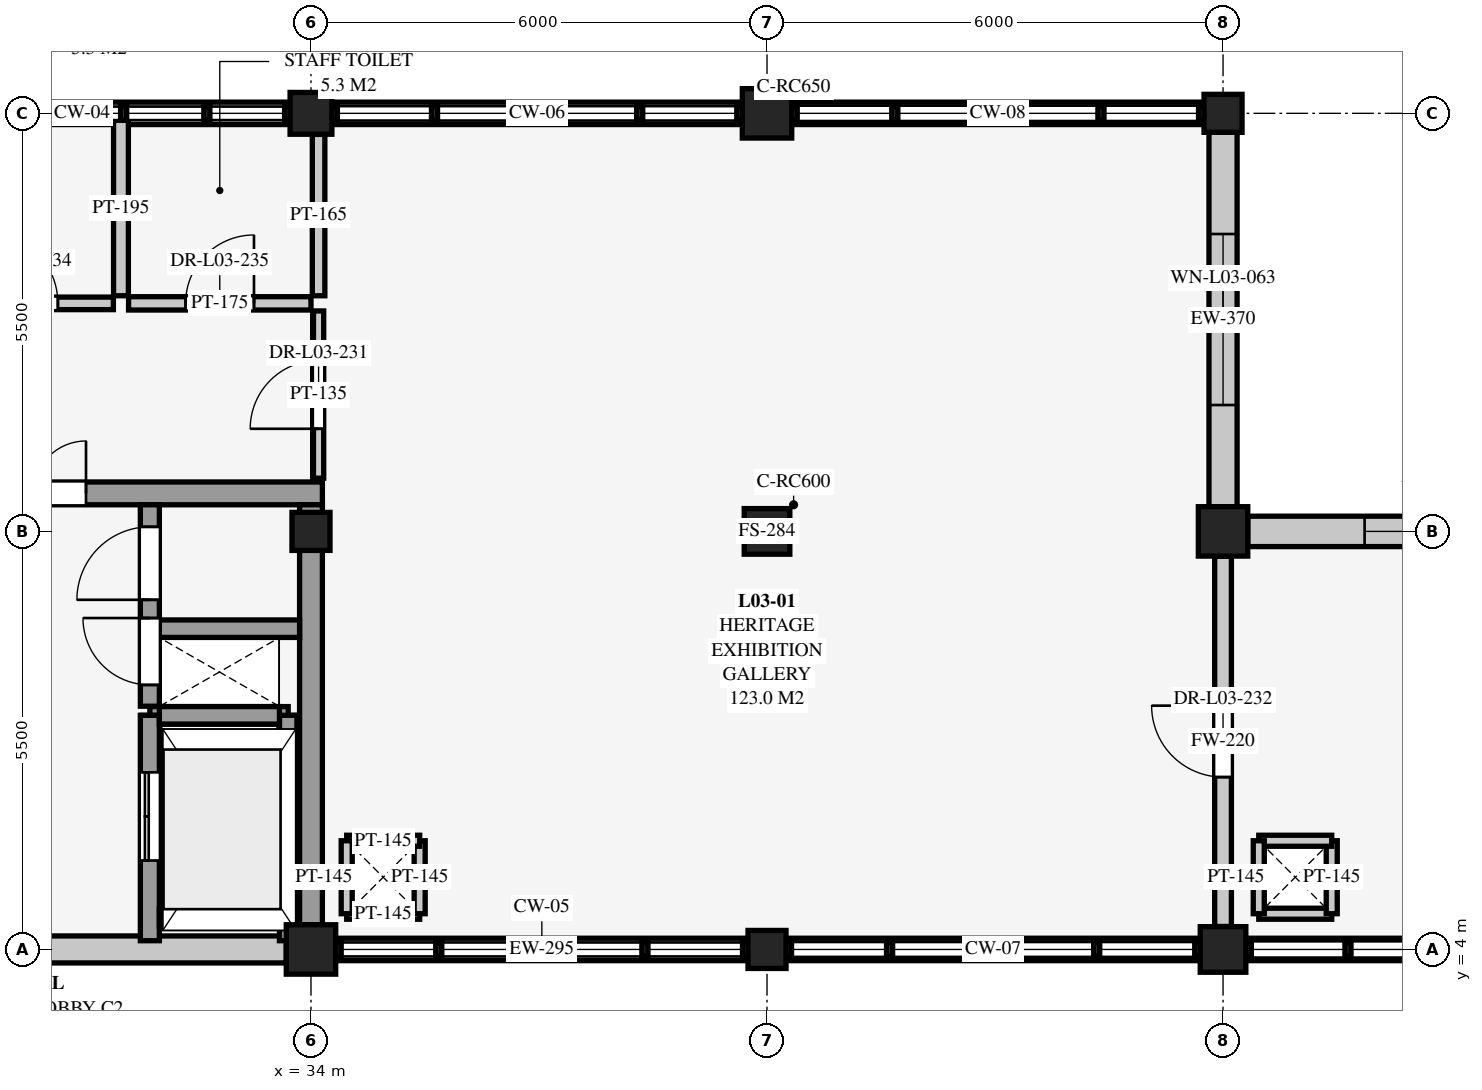
"""IFC4 building model, lengths in metres.
Left out: names, types, materials, properties, quantities, classifications, styles, units other than length and angle.
Written with IfcOpenShell. Run it as: python <this file> out.ifc"""

import sys

from ifc_helpers import new_model, si_unit, direction, frame, frame_2d, origin, origin_2d, place, context, subcontext, project, spatial, rectangle, extrude, element, fill, save


model = new_model("IFC4")
c1 = context("Model", 3, precision=1e-05, world=origin(), true_north=direction((0.0, 1.0)))
c2 = subcontext(c1, "Body", "Model", "MODEL_VIEW")
j1 = project(units=[si_unit("LENGTHUNIT", "METRE"), si_unit("PLANEANGLEUNIT", "RADIAN")], contexts=[c1])
p1 = place(None, origin())
s1 = spatial("IfcSite", under=j1, at=p1, CompositionType="ELEMENT")
p2 = place(p1, origin())
s2 = spatial("IfcBuilding", under=s1, at=p2, CompositionType="ELEMENT")
p3 = place(p2, frame((0.0, 0.0, 9.0)))
s3 = spatial("IfcBuildingStorey", under=s2, at=p3, CompositionType="ELEMENT", Elevation=9.0)
p4 = place(p3, frame((34.0, 4.0, 0.0), z_axis=(0.0, 0.0, 1.0), x_axis=(1.0, 0.0, 0.0)))
e1 = element("IfcColumn", 1, at=p4, inside=s3, PredefinedType="COLUMN", context=c2, shape_type="SweptSolid", body=[
    extrude(rectangle(XDim=0.65, YDim=0.65, at=origin_2d()), origin(), (0.0, 0.0, 1.0), 4.5),
])
p5 = place(p3, frame((34.0, 9.5, 0.0), z_axis=(0.0, 0.0, 1.0), x_axis=(1.0, 0.0, 0.0)))
e2 = element("IfcColumn", 2, at=p5, inside=s3, PredefinedType="COLUMN", context=c2, shape_type="SweptSolid", body=[
    extrude(rectangle(XDim=0.5, YDim=0.5, at=origin_2d()), origin(), (0.0, 0.0, 1.0), 4.5),
])
p6 = place(p3, frame((34.0, 15.0, 0.0), z_axis=(0.0, 0.0, 1.0), x_axis=(1.0, 0.0, 0.0)))
e3 = element("IfcColumn", 3, at=p6, inside=s3, PredefinedType="COLUMN", context=c2, shape_type="SweptSolid", body=[
    extrude(rectangle(XDim=0.55, YDim=0.55, at=origin_2d()), origin(), (0.0, 0.0, 1.0), 4.5),
])
p7 = place(p3, frame((40.0, 4.0, 0.0), z_axis=(0.0, 0.0, 1.0), x_axis=(1.0, 0.0, 0.0)))
e4 = element("IfcColumn", 4, at=p7, inside=s3, PredefinedType="COLUMN", context=c2, shape_type="SweptSolid", body=[
    extrude(rectangle(XDim=0.5, YDim=0.5, at=origin_2d()), origin(), (0.0, 0.0, 1.0), 4.5),
])
p8 = place(p3, frame((40.0, 9.5, 0.0), z_axis=(0.0, 0.0, 1.0), x_axis=(1.0, 0.0, 0.0)))
e5 = element("IfcColumn", 5, at=p8, inside=s3, PredefinedType="COLUMN", context=c2, shape_type="SweptSolid", body=[
    extrude(rectangle(XDim=0.6, YDim=0.6, at=origin_2d()), origin(), (0.0, 0.0, 1.0), 4.5),
])
p9 = place(p3, frame((40.0, 15.0, 0.0), z_axis=(0.0, 0.0, 1.0), x_axis=(1.0, 0.0, 0.0)))
e6 = element("IfcColumn", 6, at=p9, inside=s3, PredefinedType="COLUMN", context=c2, shape_type="SweptSolid", body=[
    extrude(rectangle(XDim=0.65, YDim=0.65, at=origin_2d()), origin(), (0.0, 0.0, 1.0), 4.5),
])
p10 = place(p3, frame((46.0, 4.0, 0.0), z_axis=(0.0, 0.0, 1.0), x_axis=(1.0, 0.0, 0.0)))
e7 = element("IfcColumn", 7, at=p10, inside=s3, PredefinedType="COLUMN", context=c2, shape_type="SweptSolid", body=[
    extrude(rectangle(XDim=0.6, YDim=0.6, at=origin_2d()), origin(), (0.0, 0.0, 1.0), 4.5),
])
p11 = place(p3, frame((46.0, 9.5, 0.0), z_axis=(0.0, 0.0, 1.0), x_axis=(1.0, 0.0, 0.0)))
e8 = element("IfcColumn", 8, at=p11, inside=s3, PredefinedType="COLUMN", context=c2, shape_type="SweptSolid", body=[
    extrude(rectangle(XDim=0.65, YDim=0.65, at=origin_2d()), origin(), (0.0, 0.0, 1.0), 4.5),
])
p12 = place(p3, frame((46.0, 15.0, 0.0), z_axis=(0.0, 0.0, 1.0), x_axis=(1.0, 0.0, 0.0)))
e9 = element("IfcColumn", 9, at=p12, inside=s3, PredefinedType="COLUMN", context=c2, shape_type="SweptSolid", body=[
    extrude(rectangle(XDim=0.5, YDim=0.5, at=origin_2d()), origin(), (0.0, 0.0, 1.0), 4.5),
])
p13 = place(p3, frame((33.675, 4.0, 0.0), z_axis=(0.0, 0.0, 1.0), x_axis=(-1.0, 0.0, 0.0)))
e10 = element("IfcWall", 10, at=p13, inside=s3, PredefinedType="SOLIDWALL", context=c2, shape_type="SweptSolid", body=[
    extrude(rectangle(XDim=5.375, YDim=0.355, at=frame_2d((2.688, 0.0))), origin(), (0.0, 0.0, 1.0), 4.093),
])
p14 = place(p3, frame((28.25, 15.0, 0.0), z_axis=(0.0, 0.0, 1.0), x_axis=(1.0, 0.0, 0.0)))
e11 = element("IfcWall", 11, at=p14, inside=s3, PredefinedType="SOLIDWALL", context=c2, shape_type="SweptSolid", body=[
    extrude(rectangle(XDim=5.475, YDim=0.295, at=frame_2d((2.738, 0.0))), origin(), (0.0, 0.0, 1.0), 0.31),
])
p15 = place(p3, frame((39.75, 4.0, 0.0), z_axis=(0.0, 0.0, 1.0), x_axis=(-1.0, 0.0, 0.0)))
e12 = element("IfcWall", 12, at=p15, inside=s3, PredefinedType="SOLIDWALL", context=c2, shape_type="SweptSolid", body=[
    extrude(rectangle(XDim=5.425, YDim=0.295, at=frame_2d((2.712, 0.0))), origin(), (0.0, 0.0, 1.0), 0.36),
])
p16 = place(p3, frame((34.275, 15.0, 0.0), z_axis=(0.0, 0.0, 1.0), x_axis=(1.0, 0.0, 0.0)))
e13 = element("IfcWall", 13, at=p16, inside=s3, PredefinedType="SOLIDWALL", context=c2, shape_type="SweptSolid", body=[
    extrude(rectangle(XDim=5.4, YDim=0.295, at=frame_2d((2.7, 0.0))), origin(), (0.0, 0.0, 1.0), 0.41),
])
p17 = place(p3, frame((45.7, 4.0, 0.0), z_axis=(0.0, 0.0, 1.0), x_axis=(-1.0, 0.0, 0.0)))
e14 = element("IfcWall", 14, at=p17, inside=s3, PredefinedType="SOLIDWALL", context=c2, shape_type="SweptSolid", body=[
    extrude(rectangle(XDim=5.45, YDim=0.295, at=frame_2d((2.725, 0.0))), origin(), (0.0, 0.0, 1.0), 0.46),
])
p18 = place(p3, frame((40.325, 15.0, 0.0), z_axis=(0.0, 0.0, 1.0), x_axis=(1.0, 0.0, 0.0)))
e15 = element("IfcWall", 15, at=p18, inside=s3, PredefinedType="SOLIDWALL", context=c2, shape_type="SweptSolid", body=[
    extrude(rectangle(XDim=5.425, YDim=0.295, at=frame_2d((2.712, 0.0))), origin(), (0.0, 0.0, 1.0), 0.52),
])
p19 = place(p3, frame((46.0, 14.75, 0.0), z_axis=(0.0, 0.0, 1.0), x_axis=(0.0, -1.0, 0.0)))
e16 = element("IfcWall", 16, at=p19, inside=s3, PredefinedType="SOLIDWALL", context=c2, shape_type="SweptSolid", body=[
    extrude(rectangle(XDim=4.925, YDim=0.37, at=frame_2d((2.462, 0.0))), origin(), (0.0, 0.0, 1.0), 4.093),
])
p20 = place(p19, frame((1.337, 0.0, 0.65)))
e17 = element("IfcOpeningElement", 17, at=p20, cuts=e16, PredefinedType="OPENING", context=c2, shape_type="SweptSolid", body=[
    extrude(rectangle(XDim=2.25, YDim=2.45, at=frame_2d((1.125, 1.225))), frame((0.0, 0.195, 0.0), z_axis=(0.0, -1.0, 0.0), x_axis=(1.0, 0.0, 0.0)), (0.0, 0.0, 1.0), 0.39),
])
p21 = place(p3, frame((51.675, 4.0, 0.0), z_axis=(0.0, 0.0, 1.0), x_axis=(-1.0, 0.0, 0.0)))
e18 = element("IfcWall", 18, at=p21, inside=s3, PredefinedType="SOLIDWALL", context=c2, shape_type="SweptSolid", body=[
    extrude(rectangle(XDim=5.375, YDim=0.295, at=frame_2d((2.688, 0.0))), origin(), (0.0, 0.0, 1.0), 0.21),
])
p22 = place(p3, frame((46.325, 9.5, 0.0), z_axis=(0.0, 0.0, 1.0), x_axis=(1.0, 0.0, 0.0)))
e19 = element("IfcWall", 19, at=p22, inside=s3, PredefinedType="SOLIDWALL", context=c2, shape_type="SweptSolid", body=[
    extrude(rectangle(XDim=5.425, YDim=0.4, at=frame_2d((2.712, 0.0))), origin(), (0.0, 0.0, 1.0), 4.093),
])
p23 = place(p22, frame((1.538, 0.0, 0.65)))
e20 = element("IfcOpeningElement", 20, at=p23, cuts=e19, PredefinedType="OPENING", context=c2, shape_type="SweptSolid", body=[
    extrude(rectangle(XDim=2.35, YDim=2.45, at=frame_2d((1.175, 1.225))), frame((0.0, 0.21, 0.0), z_axis=(0.0, -1.0, 0.0), x_axis=(1.0, 0.0, 0.0)), (0.0, 0.0, 1.0), 0.42),
])
for number, where, z_axis, x_axis in (
    (21, (34.47, 4.47, 0.0), (0.0, 0.0, 1.0), (1.0, 0.0, 0.0)),
    (22, (35.43, 4.47, 0.0), (0.0, 0.0, 1.0), (0.0, 1.0, 0.0)),
    (23, (35.43, 5.43, 0.0), (0.0, 0.0, 1.0), (-1.0, 0.0, 0.0)),
    (24, (34.47, 5.43, 0.0), (0.0, 0.0, 1.0), (0.0, -1.0, 0.0)),
    (25, (46.47, 4.47, 0.0), (0.0, 0.0, 1.0), (1.0, 0.0, 0.0)),
    (26, (47.43, 4.47, 0.0), (0.0, 0.0, 1.0), (0.0, 1.0, 0.0)),
    (27, (47.43, 5.43, 0.0), (0.0, 0.0, 1.0), (-1.0, 0.0, 0.0)),
    (28, (46.47, 5.43, 0.0), (0.0, 0.0, 1.0), (0.0, -1.0, 0.0)),
):
    element("IfcWall", number, at=place(p3, frame(where, z_axis=z_axis, x_axis=x_axis)), inside=s3, PredefinedType="PARTITIONING", context=c2, shape_type="SweptSolid", body=[
        extrude(rectangle(XDim=0.96, YDim=0.145, at=frame_2d((0.48, 0.0))), origin(), (0.0, 0.0, 1.0), 4.24),
    ])
p24 = place(p3, frame((31.88, 4.42, 4.5), z_axis=(0.0, 0.0, 1.0), x_axis=(1.0, 0.0, 0.0)))
e29 = element("IfcWall", 29, at=p24, inside=s3, PredefinedType="SHEAR", context=c2, shape_type="SweptSolid", body=[
    extrude(rectangle(XDim=1.82, YDim=0.23, at=frame_2d((0.91, 0.0))), origin(), (0.0, 0.0, 1.0), 1.25),
])
p25 = place(p3, frame((33.7, 4.42, 4.5), z_axis=(0.0, 0.0, 1.0), x_axis=(0.0, 1.0, 0.0)))
e30 = element("IfcWall", 30, at=p25, inside=s3, PredefinedType="SHEAR", context=c2, shape_type="SweptSolid", body=[
    extrude(rectangle(XDim=2.66, YDim=0.23, at=frame_2d((1.33, 0.0))), origin(), (0.0, 0.0, 1.0), 1.25),
])
p26 = place(p3, frame((33.7, 7.08, 4.5), z_axis=(0.0, 0.0, 1.0), x_axis=(-1.0, 0.0, 0.0)))
e31 = element("IfcWall", 31, at=p26, inside=s3, PredefinedType="SHEAR", context=c2, shape_type="SweptSolid", body=[
    extrude(rectangle(XDim=1.82, YDim=0.23, at=frame_2d((0.91, 0.0))), origin(), (0.0, 0.0, 1.0), 1.25),
])
p27 = place(p3, frame((31.88, 7.08, 4.5), z_axis=(0.0, 0.0, 1.0), x_axis=(0.0, -1.0, 0.0)))
e32 = element("IfcWall", 32, at=p27, inside=s3, PredefinedType="SHEAR", context=c2, shape_type="SweptSolid", body=[
    extrude(rectangle(XDim=2.66, YDim=0.23, at=frame_2d((1.33, 0.0))), origin(), (0.0, 0.0, 1.0), 1.25),
])
p28 = place(p3, frame((28.0, 10.0, 0.0), z_axis=(0.0, 0.0, 1.0), x_axis=(1.0, 0.0, 0.0)))
e33 = element("IfcWall", 33, at=p28, inside=s3, PredefinedType="SHEAR", context=c2, shape_type="SweptSolid", body=[
    extrude(rectangle(XDim=6.15, YDim=0.3, at=frame_2d((3.075, 0.0))), origin(), (0.0, 0.0, 1.0), 4.24),
])
p29 = place(p28, frame((1.66, 0.0, 0.0)))
e34 = element("IfcOpeningElement", 34, at=p29, cuts=e33, PredefinedType="OPENING", context=c2, shape_type="SweptSolid", body=[
    extrude(rectangle(XDim=1.38, YDim=2.16, at=frame_2d((0.69, 1.08))), frame((0.0, 0.16, 0.0), z_axis=(0.0, -1.0, 0.0), x_axis=(1.0, 0.0, 0.0)), (0.0, 0.0, 1.0), 0.32),
])
p30 = place(p3, frame((34.0, 4.325, 0.0), z_axis=(0.0, 0.0, 1.0), x_axis=(0.0, 1.0, 0.0)))
e35 = element("IfcWall", 35, at=p30, inside=s3, PredefinedType="SHEAR", context=c2, shape_type="SweptSolid", body=[
    extrude(rectangle(XDim=5.525, YDim=0.3, at=frame_2d((2.763, 0.0))), origin(), (0.0, 0.0, 1.0), 4.24),
])
p31 = place(p3, frame((31.88, 4.115, 0.0), z_axis=(0.0, 0.0, 1.0), x_axis=(0.0, 1.0, 0.0)))
e36 = element("IfcWall", 36, at=p31, inside=s3, PredefinedType="SHEAR", context=c2, shape_type="SweptSolid", body=[
    extrude(rectangle(XDim=2.965, YDim=0.25, at=frame_2d((1.482, 0.0))), origin(), (0.0, 0.0, 1.0), 4.5),
])
p32 = place(p31, frame((1.055, 0.0, 0.0)))
e37 = element("IfcOpeningElement", 37, at=p32, cuts=e36, PredefinedType="OPENING", context=c2, shape_type="SweptSolid", body=[
    extrude(rectangle(XDim=1.16, YDim=2.18, at=frame_2d((0.58, 1.09))), frame((0.0, 0.135, 0.0), z_axis=(0.0, -1.0, 0.0), x_axis=(1.0, 0.0, 0.0)), (0.0, 0.0, 1.0), 0.27),
])
p33 = place(p3, frame((32.005, 4.42, 0.0), z_axis=(0.0, 0.0, 1.0), x_axis=(1.0, 0.0, 0.0)))
e38 = element("IfcWall", 38, at=p33, inside=s3, PredefinedType="SHEAR", context=c2, shape_type="SweptSolid", body=[
    extrude(rectangle(XDim=1.58, YDim=0.23, at=frame_2d((0.79, 0.0))), origin(), (0.0, 0.0, 1.0), 4.5),
])
p34 = place(p3, frame((33.7, 4.115, 0.0), z_axis=(0.0, 0.0, 1.0), x_axis=(0.0, 1.0, 0.0)))
e39 = element("IfcWall", 39, at=p34, inside=s3, PredefinedType="SHEAR", context=c2, shape_type="SweptSolid", body=[
    extrude(rectangle(XDim=2.965, YDim=0.23, at=frame_2d((1.482, 0.0))), origin(), (0.0, 0.0, 1.0), 4.5),
])
p35 = place(p3, frame((32.005, 7.08, 0.0), z_axis=(0.0, 0.0, 1.0), x_axis=(1.0, 0.0, 0.0)))
e40 = element("IfcWall", 40, at=p35, inside=s3, PredefinedType="SHEAR", context=c2, shape_type="SweptSolid", body=[
    extrude(rectangle(XDim=1.58, YDim=0.23, at=frame_2d((0.79, 0.0))), origin(), (0.0, 0.0, 1.0), 4.5),
])
p36 = place(p3, frame((31.88, 7.2, 0.0), z_axis=(0.0, 0.0, 1.0), x_axis=(0.0, 1.0, 0.0)))
e41 = element("IfcWall", 41, at=p36, inside=s3, PredefinedType="SHEAR", context=c2, shape_type="SweptSolid", body=[
    extrude(rectangle(XDim=2.65, YDim=0.25, at=frame_2d((1.325, 0.0))), origin(), (0.0, 0.0, 1.0), 4.24),
])
p37 = place(p36, frame((0.28, 0.0, 0.0)))
e42 = element("IfcOpeningElement", 42, at=p37, cuts=e41, PredefinedType="OPENING", context=c2, shape_type="SweptSolid", body=[
    extrude(rectangle(XDim=0.88, YDim=2.08, at=frame_2d((0.44, 1.04))), frame((0.0, 0.135, 0.0), z_axis=(0.0, -1.0, 0.0), x_axis=(1.0, 0.0, 0.0)), (0.0, 0.0, 1.0), 0.27),
])
p38 = place(p36, frame((1.4, 0.0, 0.0)))
e43 = element("IfcOpeningElement", 43, at=p38, cuts=e41, PredefinedType="OPENING", context=c2, shape_type="SweptSolid", body=[
    extrude(rectangle(XDim=0.96, YDim=2.12, at=frame_2d((0.48, 1.06))), frame((0.0, 0.135, 0.0), z_axis=(0.0, -1.0, 0.0), x_axis=(1.0, 0.0, 0.0)), (0.0, 0.0, 1.0), 0.27),
])
p39 = place(p3, frame((32.005, 8.22, 0.0), z_axis=(0.0, 0.0, 1.0), x_axis=(1.0, 0.0, 0.0)))
e44 = element("IfcWall", 44, at=p39, inside=s3, PredefinedType="SHEAR", context=c2, shape_type="SweptSolid", body=[
    extrude(rectangle(XDim=1.845, YDim=0.23, at=frame_2d((0.923, 0.0))), origin(), (0.0, 0.0, 1.0), 4.24),
])
p40 = place(p3, frame((34.1, 10.2, 0.0), z_axis=(0.0, 0.0, 1.0), x_axis=(0.0, 1.0, 0.0)))
e45 = element("IfcWall", 45, at=p40, inside=s3, PredefinedType="PARTITIONING", context=c2, shape_type="SweptSolid", body=[
    extrude(rectangle(XDim=2.2, YDim=0.135, at=frame_2d((1.1, 0.0))), origin(), (0.0, 0.0, 1.0), 4.24),
])
p41 = place(p40, frame((0.65, 0.0, 0.0)))
e46 = element("IfcOpeningElement", 46, at=p41, cuts=e45, PredefinedType="OPENING", context=c2, shape_type="SweptSolid", body=[
    extrude(rectangle(XDim=0.9, YDim=2.1, at=frame_2d((0.45, 1.05))), frame((0.0, 0.077, 0.0), z_axis=(0.0, -1.0, 0.0), x_axis=(1.0, 0.0, 0.0)), (0.0, 0.0, 1.0), 0.155),
])
p42 = place(p3, frame((34.1, 12.6, 0.0), z_axis=(0.0, 0.0, 1.0), x_axis=(0.0, 1.0, 0.0)))
e47 = element("IfcWall", 47, at=p42, inside=s3, PredefinedType="PARTITIONING", context=c2, shape_type="SweptSolid", body=[
    extrude(rectangle(XDim=2.123, YDim=0.165, at=frame_2d((1.062, 0.0))), origin(), (0.0, 0.0, 1.0), 4.24),
])
p43 = place(p3, frame((46.0, 4.302, 0.0), z_axis=(0.0, 0.0, 1.0), x_axis=(0.0, 1.0, 0.0)))
e48 = element("IfcWall", 48, at=p43, inside=s3, PredefinedType="SOLIDWALL", context=c2, shape_type="SweptSolid", body=[
    extrude(rectangle(XDim=4.871, YDim=0.22, at=frame_2d((2.436, 0.0))), origin(), (0.0, 0.0, 1.0), 4.043),
])
p44 = place(p43, frame((1.966, 0.0, 0.0)))
e49 = element("IfcOpeningElement", 49, at=p44, cuts=e48, PredefinedType="OPENING", context=c2, shape_type="SweptSolid", body=[
    extrude(rectangle(XDim=0.94, YDim=2.1, at=frame_2d((0.47, 1.05))), frame((0.0, 0.12, 0.0), z_axis=(0.0, -1.0, 0.0), x_axis=(1.0, 0.0, 0.0)), (0.0, 0.0, 1.0), 0.24),
])
p45 = place(p3, frame((29.0, 12.5, 0.0), z_axis=(0.0, 0.0, 1.0), x_axis=(1.0, 0.0, 0.0)))
e50 = element("IfcWall", 50, at=p45, inside=s3, PredefinedType="PARTITIONING", context=c2, shape_type="SweptSolid", body=[
    extrude(rectangle(XDim=2.4, YDim=0.165, at=frame_2d((1.2, 0.0))), origin(), (0.0, 0.0, 1.0), 4.24),
])
p46 = place(p45, frame((0.73, 0.0, 0.0)))
e51 = element("IfcOpeningElement", 51, at=p46, cuts=e50, PredefinedType="OPENING", context=c2, shape_type="SweptSolid", body=[
    extrude(rectangle(XDim=0.94, YDim=2.1, at=frame_2d((0.47, 1.05))), frame((0.0, 0.093, 0.0), z_axis=(0.0, -1.0, 0.0), x_axis=(1.0, 0.0, 0.0)), (0.0, 0.0, 1.0), 0.185),
])
p47 = place(p3, frame((31.6, 12.5, 0.0), z_axis=(0.0, 0.0, 1.0), x_axis=(1.0, 0.0, 0.0)))
e52 = element("IfcWall", 52, at=p47, inside=s3, PredefinedType="PARTITIONING", context=c2, shape_type="SweptSolid", body=[
    extrude(rectangle(XDim=2.4, YDim=0.175, at=frame_2d((1.2, 0.0))), origin(), (0.0, 0.0, 1.0), 4.24),
])
p48 = place(p47, frame((0.75, 0.0, 0.0)))
e53 = element("IfcOpeningElement", 53, at=p48, cuts=e52, PredefinedType="OPENING", context=c2, shape_type="SweptSolid", body=[
    extrude(rectangle(XDim=0.9, YDim=2.1, at=frame_2d((0.45, 1.05))), frame((0.0, 0.097, 0.0), z_axis=(0.0, -1.0, 0.0), x_axis=(1.0, 0.0, 0.0)), (0.0, 0.0, 1.0), 0.195),
])
p49 = place(p3, frame((31.5, 12.6, 0.0), z_axis=(0.0, 0.0, 1.0), x_axis=(0.0, 1.0, 0.0)))
e54 = element("IfcWall", 54, at=p49, inside=s3, PredefinedType="PARTITIONING", context=c2, shape_type="SweptSolid", body=[
    extrude(rectangle(XDim=2.309, YDim=0.195, at=frame_2d((1.154, 0.0))), origin(), (0.0, 0.0, 1.0), 4.24),
])
p50 = place(p20, origin())
e55 = element("IfcWindow", 55, at=p50, inside=s3, PartitioningType="SINGLE_PANEL", PredefinedType="WINDOW", context=c2, shape_type="SweptSolid", body=[
    extrude(rectangle(XDim=2.25, YDim=2.45, at=frame_2d((1.125, 1.225))), frame((0.0, 0.03, 0.0), z_axis=(0.0, -1.0, 0.0), x_axis=(1.0, 0.0, 0.0)), (0.0, 0.0, 1.0), 0.06),
])
fill(e17, e55)
p51 = place(p23, origin())
e56 = element("IfcWindow", 56, at=p51, inside=s3, PartitioningType="SINGLE_PANEL", PredefinedType="WINDOW", context=c2, shape_type="SweptSolid", body=[
    extrude(rectangle(XDim=2.35, YDim=2.45, at=frame_2d((1.175, 1.225))), frame((0.0, 0.03, 0.0), z_axis=(0.0, -1.0, 0.0), x_axis=(1.0, 0.0, 0.0)), (0.0, 0.0, 1.0), 0.06),
])
fill(e20, e56)
p52 = place(p29, origin())
e57 = element("IfcDoor", 57, at=p52, inside=s3, OperationType="DOUBLE_DOOR_SINGLE_SWING", PredefinedType="DOOR", context=c2, shape_type="SweptSolid", body=[
    extrude(rectangle(XDim=1.38, YDim=2.16, at=frame_2d((0.69, 1.08))), frame((0.0, 0.025, 0.0), z_axis=(0.0, -1.0, 0.0), x_axis=(1.0, 0.0, 0.0)), (0.0, 0.0, 1.0), 0.05),
])
fill(e34, e57)
p53 = place(p32, origin())
e58 = element("IfcDoor", 58, at=p53, inside=s3, OperationType="DOUBLE_DOOR_SLIDING", PredefinedType="DOOR", context=c2, shape_type="SweptSolid", body=[
    extrude(rectangle(XDim=1.16, YDim=2.18, at=frame_2d((0.58, 1.09))), frame((0.0, 0.025, 0.0), z_axis=(0.0, -1.0, 0.0), x_axis=(1.0, 0.0, 0.0)), (0.0, 0.0, 1.0), 0.05),
])
fill(e37, e58)
p54 = place(p37, origin())
e59 = element("IfcDoor", 59, at=p54, inside=s3, OperationType="SINGLE_SWING_RIGHT", PredefinedType="DOOR", context=c2, shape_type="SweptSolid", body=[
    extrude(rectangle(XDim=0.88, YDim=2.08, at=frame_2d((0.44, 1.04))), frame((0.0, 0.025, 0.0), z_axis=(0.0, -1.0, 0.0), x_axis=(1.0, 0.0, 0.0)), (0.0, 0.0, 1.0), 0.05),
])
fill(e42, e59)
p55 = place(p38, origin())
e60 = element("IfcDoor", 60, at=p55, inside=s3, OperationType="SINGLE_SWING_LEFT", PredefinedType="DOOR", context=c2, shape_type="SweptSolid", body=[
    extrude(rectangle(XDim=0.96, YDim=2.12, at=frame_2d((0.48, 1.06))), frame((0.0, 0.025, 0.0), z_axis=(0.0, -1.0, 0.0), x_axis=(1.0, 0.0, 0.0)), (0.0, 0.0, 1.0), 0.05),
])
fill(e43, e60)
p56 = place(p41, origin())
e61 = element("IfcDoor", 61, at=p56, inside=s3, OperationType="SINGLE_SWING_LEFT", PredefinedType="DOOR", context=c2, shape_type="SweptSolid", body=[
    extrude(rectangle(XDim=0.9, YDim=2.1, at=frame_2d((0.45, 1.05))), frame((0.0, 0.025, 0.0), z_axis=(0.0, -1.0, 0.0), x_axis=(1.0, 0.0, 0.0)), (0.0, 0.0, 1.0), 0.05),
])
fill(e46, e61)
p57 = place(p44, origin())
e62 = element("IfcDoor", 62, at=p57, inside=s3, OperationType="SINGLE_SWING_RIGHT", PredefinedType="DOOR", context=c2, shape_type="SweptSolid", body=[
    extrude(rectangle(XDim=0.94, YDim=2.1, at=frame_2d((0.47, 1.05))), frame((0.0, 0.025, 0.0), z_axis=(0.0, -1.0, 0.0), x_axis=(1.0, 0.0, 0.0)), (0.0, 0.0, 1.0), 0.05),
])
fill(e49, e62)
p58 = place(p46, origin())
e63 = element("IfcDoor", 63, at=p58, inside=s3, OperationType="SINGLE_SWING_LEFT", PredefinedType="DOOR", context=c2, shape_type="SweptSolid", body=[
    extrude(rectangle(XDim=0.94, YDim=2.1, at=frame_2d((0.47, 1.05))), frame((0.0, 0.025, 0.0), z_axis=(0.0, -1.0, 0.0), x_axis=(1.0, 0.0, 0.0)), (0.0, 0.0, 1.0), 0.05),
])
fill(e51, e63)
p59 = place(p48, origin())
e64 = element("IfcDoor", 64, at=p59, inside=s3, OperationType="SINGLE_SWING_RIGHT", PredefinedType="DOOR", context=c2, shape_type="SweptSolid", body=[
    extrude(rectangle(XDim=0.9, YDim=2.1, at=frame_2d((0.45, 1.05))), frame((0.0, 0.025, 0.0), z_axis=(0.0, -1.0, 0.0), x_axis=(1.0, 0.0, 0.0)), (0.0, 0.0, 1.0), 0.05),
])
fill(e53, e64)
save(model, sys.argv[1])
